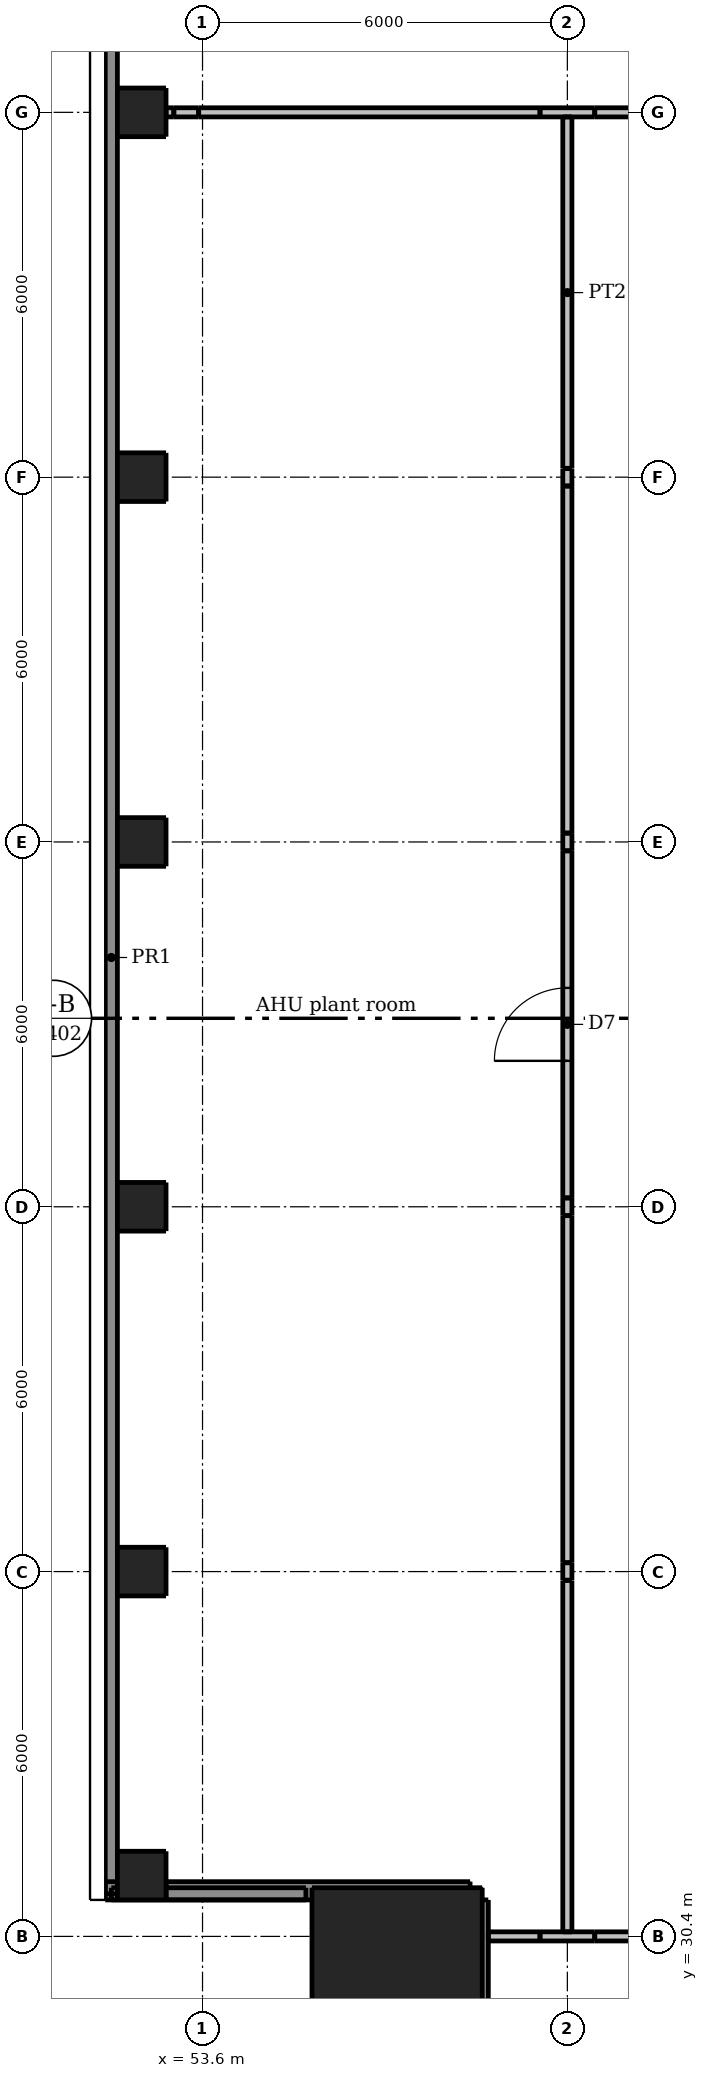
"""IFC4 building model, lengths in metres.
Left out: names, types, materials, properties, quantities, classifications, styles, units other than length and angle.
Written with IfcOpenShell. Run it as: python <this file> out.ifc"""

import sys

from ifc_helpers import new_model, si_unit, direction, frame, frame_2d, origin, origin_2d, place, context, subcontext, project, spatial, rectangle, extrude, element, fill, save


model = new_model("IFC4")
c1 = context("Model", 3, precision=1e-05, world=origin(), true_north=direction((0.0, 1.0)))
c2 = subcontext(c1, "Body", "Model", "MODEL_VIEW")
j1 = project(units=[si_unit("LENGTHUNIT", "METRE"), si_unit("PLANEANGLEUNIT", "RADIAN")], contexts=[c1])
p1 = place(None, origin())
s1 = spatial("IfcSite", under=j1, at=p1, CompositionType="ELEMENT")
p2 = place(p1, origin())
s2 = spatial("IfcBuilding", under=s1, at=p2, CompositionType="ELEMENT")
p3 = place(p2, frame((0.0, 0.0, 286.3)))
s3 = spatial("IfcBuildingStorey", under=s2, at=p3, CompositionType="ELEMENT", Elevation=286.3)
for number, where, z_axis, x_axis in (
    (1, (52.6, 31.4, 0.0), (0.0, 0.0, 1.0), (1.0, 0.0, 0.0)),
    (2, (52.6, 36.4, 0.0), (0.0, 0.0, 1.0), (1.0, 0.0, 0.0)),
    (3, (52.6, 42.4, 0.0), (0.0, 0.0, 1.0), (1.0, 0.0, 0.0)),
    (4, (52.6, 48.4, 0.0), (0.0, 0.0, 1.0), (1.0, 0.0, 0.0)),
    (5, (52.6, 54.4, 0.0), (0.0, 0.0, 1.0), (1.0, 0.0, 0.0)),
    (6, (52.6, 60.4, 0.0), (0.0, 0.0, 1.0), (1.0, 0.0, 0.0)),
):
    element("IfcColumn", number, at=place(p3, frame(where, z_axis=z_axis, x_axis=x_axis)), inside=s3, PredefinedType="COLUMN", context=c2, shape_type="SweptSolid", body=[
        extrude(rectangle(XDim=0.8, YDim=0.8, at=origin_2d()), origin(), (0.0, 0.0, 1.0), 4.2),
    ])
p4 = place(p3, frame((56.8, 29.8, 0.0), z_axis=(0.0, 0.0, 1.0), x_axis=(1.0, 0.0, 0.0)))
e7 = element("IfcColumn", 7, at=p4, inside=s3, PredefinedType="COLUMN", context=c2, shape_type="SweptSolid", body=[
    extrude(rectangle(XDim=2.8, YDim=2.8, at=origin_2d()), origin(), (0.0, 0.0, 1.0), 4.5),
])
p5 = place(p3, frame((52.0, 31.15, 0.0), z_axis=(0.0, 0.0, 1.0), x_axis=(1.0, 0.0, 0.0)))
e8 = element("IfcWall", 8, at=p5, inside=s3, PredefinedType="SOLIDWALL", context=c2, shape_type="SweptSolid", body=[
    extrude(rectangle(XDim=0.2, YDim=0.3, at=frame_2d((0.1, 0.0))), origin(), (0.0, 0.0, 1.0), 4.2),
])
p6 = place(p3, frame((53.0, 31.15, 0.0), z_axis=(0.0, 0.0, 1.0), x_axis=(1.0, 0.0, 0.0)))
e9 = element("IfcWall", 9, at=p6, inside=s3, PredefinedType="SOLIDWALL", context=c2, shape_type="SweptSolid", body=[
    extrude(rectangle(XDim=5.0, YDim=0.3, at=frame_2d((2.5, 0.0))), origin(), (0.0, 0.0, 1.0), 4.2),
])
p7 = place(p3, frame((58.15, 31.0, 0.0), z_axis=(0.0, 0.0, 1.0), x_axis=(0.0, -1.0, 0.0)))
e10 = element("IfcWall", 10, at=p7, inside=s3, PredefinedType="SOLIDWALL", context=c2, shape_type="SweptSolid", body=[
    extrude(rectangle(XDim=6.0, YDim=0.3, at=frame_2d((3.0, 0.0))), origin(), (0.0, 0.0, 1.0), 4.2),
])
p8 = place(p3, frame((55.3, 31.1, 4.5), z_axis=(0.0, 0.0, 1.0), x_axis=(-1.0, 0.0, 0.0)))
e11 = element("IfcWall", 11, at=p8, inside=s3, PredefinedType="PARAPET", context=c2, shape_type="SweptSolid", body=[
    extrude(rectangle(XDim=3.2, YDim=0.2, at=frame_2d((1.6, 0.0))), origin(), (0.0, 0.0, 1.0), 1.1),
])
p9 = place(p3, frame((52.1, 31.1, 4.5), z_axis=(0.0, 0.0, 1.0), x_axis=(0.0, 1.0, 0.0)))
e12 = element("IfcWall", 12, at=p9, inside=s3, PredefinedType="PARAPET", context=c2, shape_type="SweptSolid", body=[
    extrude(rectangle(XDim=30.8, YDim=0.2, at=frame_2d((15.4, 0.0))), origin(), (0.0, 0.0, 1.0), 1.1),
])
p10 = place(p3, frame((58.3, 30.4, 0.0), z_axis=(0.0, 0.0, 1.0), x_axis=(1.0, 0.0, 0.0)))
e13 = element("IfcWall", 13, at=p10, inside=s3, PredefinedType="PARTITIONING", context=c2, shape_type="SweptSolid", body=[
    extrude(rectangle(XDim=0.85, YDim=0.15, at=frame_2d((0.425, 0.0))), origin(), (0.0, 0.0, 1.0), 4.2),
])
p11 = place(p3, frame((59.15, 30.4, 0.0), z_axis=(0.0, 0.0, 1.0), x_axis=(1.0, 0.0, 0.0)))
e14 = element("IfcWall", 14, at=p11, inside=s3, PredefinedType="PARTITIONING", context=c2, shape_type="SweptSolid", body=[
    extrude(rectangle(XDim=0.9, YDim=0.15, at=frame_2d((0.45, 0.0))), origin(), (0.0, 0.0, 1.0), 2.897),
])
p12 = place(p3, frame((60.05, 30.4, 0.0), z_axis=(0.0, 0.0, 1.0), x_axis=(1.0, 0.0, 0.0)))
e15 = element("IfcWall", 15, at=p12, inside=s3, PredefinedType="PARTITIONING", context=c2, shape_type="SweptSolid", body=[
    extrude(rectangle(XDim=5.404, YDim=0.15, at=frame_2d((2.702, 0.0))), origin(), (0.0, 0.0, 1.0), 4.2),
])
p13 = place(p3, frame((53.0, 60.4, 0.0), z_axis=(0.0, 0.0, 1.0), x_axis=(1.0, 0.0, 0.0)))
e16 = element("IfcWall", 16, at=p13, inside=s3, PredefinedType="PARTITIONING", context=c2, shape_type="SweptSolid", body=[
    extrude(rectangle(XDim=0.128, YDim=0.15, at=frame_2d((0.064, 0.0))), origin(), (0.0, 0.0, 1.0), 3.365),
])
p14 = place(p3, frame((53.128, 60.4, 0.0), z_axis=(0.0, 0.0, 1.0), x_axis=(1.0, 0.0, 0.0)))
e17 = element("IfcWall", 17, at=p14, inside=s3, PredefinedType="PARTITIONING", context=c2, shape_type="SweptSolid", body=[
    extrude(rectangle(XDim=0.409, YDim=0.15, at=frame_2d((0.205, 0.0))), origin(), (0.0, 0.0, 1.0), 3.286),
])
p15 = place(p3, frame((53.537, 60.4, 0.0), z_axis=(0.0, 0.0, 1.0), x_axis=(1.0, 0.0, 0.0)))
e18 = element("IfcWall", 18, at=p15, inside=s3, PredefinedType="PARTITIONING", context=c2, shape_type="SweptSolid", body=[
    extrude(rectangle(XDim=5.613, YDim=0.15, at=frame_2d((2.807, 0.0))), origin(), (0.0, 0.0, 1.0), 3.365),
])
p16 = place(p3, frame((59.15, 60.4, 0.0), z_axis=(0.0, 0.0, 1.0), x_axis=(1.0, 0.0, 0.0)))
e19 = element("IfcWall", 19, at=p16, inside=s3, PredefinedType="PARTITIONING", context=c2, shape_type="SweptSolid", body=[
    extrude(rectangle(XDim=0.9, YDim=0.15, at=frame_2d((0.45, 0.0))), origin(), (0.0, 0.0, 1.0), 2.897),
])
p17 = place(p3, frame((60.05, 60.4, 0.0), z_axis=(0.0, 0.0, 1.0), x_axis=(1.0, 0.0, 0.0)))
e20 = element("IfcWall", 20, at=p17, inside=s3, PredefinedType="PARTITIONING", context=c2, shape_type="SweptSolid", body=[
    extrude(rectangle(XDim=5.404, YDim=0.15, at=frame_2d((2.702, 0.0))), origin(), (0.0, 0.0, 1.0), 4.2),
])
p18 = place(p17, frame((1.95, 0.0, 0.0)))
e21 = element("IfcOpeningElement", 21, at=p18, cuts=e20, PredefinedType="OPENING", context=c2, shape_type="SweptSolid", body=[
    extrude(rectangle(XDim=1.2, YDim=2.1, at=frame_2d((0.6, 1.05))), frame((0.0, 0.085, 0.0), z_axis=(0.0, -1.0, 0.0), x_axis=(1.0, 0.0, 0.0)), (0.0, 0.0, 1.0), 0.17),
])
p19 = place(p3, frame((59.6, 30.475, 0.0), z_axis=(0.0, 0.0, 1.0), x_axis=(0.0, 1.0, 0.0)))
e22 = element("IfcWall", 22, at=p19, inside=s3, PredefinedType="PARTITIONING", context=c2, shape_type="SweptSolid", body=[
    extrude(rectangle(XDim=5.779, YDim=0.15, at=frame_2d((2.89, 0.0))), origin(), (0.0, 0.0, 1.0), 2.897),
])
p20 = place(p3, frame((59.6, 36.259, 0.0), z_axis=(0.0, 0.0, 1.0), x_axis=(0.0, 1.0, 0.0)))
e23 = element("IfcWall", 23, at=p20, inside=s3, PredefinedType="PARTITIONING", context=c2, shape_type="SweptSolid", body=[
    extrude(rectangle(XDim=0.287, YDim=0.15, at=frame_2d((0.143, 0.0))), origin(), (0.0, 0.0, 1.0), 3.359),
])
p21 = place(p3, frame((59.6, 36.546, 0.0), z_axis=(0.0, 0.0, 1.0), x_axis=(0.0, 1.0, 0.0)))
e24 = element("IfcWall", 24, at=p21, inside=s3, PredefinedType="PARTITIONING", context=c2, shape_type="SweptSolid", body=[
    extrude(rectangle(XDim=5.708, YDim=0.15, at=frame_2d((2.854, 0.0))), origin(), (0.0, 0.0, 1.0), 4.2),
])
p22 = place(p3, frame((59.6, 42.254, 0.0), z_axis=(0.0, 0.0, 1.0), x_axis=(0.0, 1.0, 0.0)))
e25 = element("IfcWall", 25, at=p22, inside=s3, PredefinedType="PARTITIONING", context=c2, shape_type="SweptSolid", body=[
    extrude(rectangle(XDim=0.292, YDim=0.15, at=frame_2d((0.146, 0.0))), origin(), (0.0, 0.0, 1.0), 3.365),
])
p23 = place(p3, frame((59.6, 42.546, 0.0), z_axis=(0.0, 0.0, 1.0), x_axis=(0.0, 1.0, 0.0)))
e26 = element("IfcWall", 26, at=p23, inside=s3, PredefinedType="PARTITIONING", context=c2, shape_type="SweptSolid", body=[
    extrude(rectangle(XDim=5.708, YDim=0.15, at=frame_2d((2.854, 0.0))), origin(), (0.0, 0.0, 1.0), 4.2),
])
p24 = place(p23, frame((2.254, 0.0, 0.0)))
e27 = element("IfcOpeningElement", 27, at=p24, cuts=e26, PredefinedType="OPENING", context=c2, shape_type="SweptSolid", body=[
    extrude(rectangle(XDim=1.2, YDim=2.1, at=frame_2d((0.6, 1.05))), frame((0.0, 0.085, 0.0), z_axis=(0.0, -1.0, 0.0), x_axis=(1.0, 0.0, 0.0)), (0.0, 0.0, 1.0), 0.17),
])
p25 = place(p3, frame((59.6, 48.254, 0.0), z_axis=(0.0, 0.0, 1.0), x_axis=(0.0, 1.0, 0.0)))
e28 = element("IfcWall", 28, at=p25, inside=s3, PredefinedType="PARTITIONING", context=c2, shape_type="SweptSolid", body=[
    extrude(rectangle(XDim=0.292, YDim=0.15, at=frame_2d((0.146, 0.0))), origin(), (0.0, 0.0, 1.0), 3.365),
])
p26 = place(p3, frame((59.6, 48.546, 0.0), z_axis=(0.0, 0.0, 1.0), x_axis=(0.0, 1.0, 0.0)))
e29 = element("IfcWall", 29, at=p26, inside=s3, PredefinedType="PARTITIONING", context=c2, shape_type="SweptSolid", body=[
    extrude(rectangle(XDim=5.708, YDim=0.15, at=frame_2d((2.854, 0.0))), origin(), (0.0, 0.0, 1.0), 4.2),
])
p27 = place(p3, frame((59.6, 54.254, 0.0), z_axis=(0.0, 0.0, 1.0), x_axis=(0.0, 1.0, 0.0)))
e30 = element("IfcWall", 30, at=p27, inside=s3, PredefinedType="PARTITIONING", context=c2, shape_type="SweptSolid", body=[
    extrude(rectangle(XDim=0.287, YDim=0.15, at=frame_2d((0.143, 0.0))), origin(), (0.0, 0.0, 1.0), 3.359),
])
p28 = place(p3, frame((59.6, 54.546, 0.0), z_axis=(0.0, 0.0, 1.0), x_axis=(0.0, 1.0, 0.0)))
e31 = element("IfcWall", 31, at=p28, inside=s3, PredefinedType="PARTITIONING", context=c2, shape_type="SweptSolid", body=[
    extrude(rectangle(XDim=5.779, YDim=0.15, at=frame_2d((2.89, 0.0))), origin(), (0.0, 0.0, 1.0), 2.897),
])
p29 = place(p24, origin())
e32 = element("IfcDoor", 32, at=p29, inside=s3, OperationType="SINGLE_SWING_LEFT", PredefinedType="DOOR", context=c2, shape_type="SweptSolid", body=[
    extrude(rectangle(XDim=1.2, YDim=2.1, at=frame_2d((0.6, 1.05))), frame((0.0, 0.025, 0.0), z_axis=(0.0, -1.0, 0.0), x_axis=(1.0, 0.0, 0.0)), (0.0, 0.0, 1.0), 0.05),
])
fill(e27, e32)
save(model, sys.argv[1])
